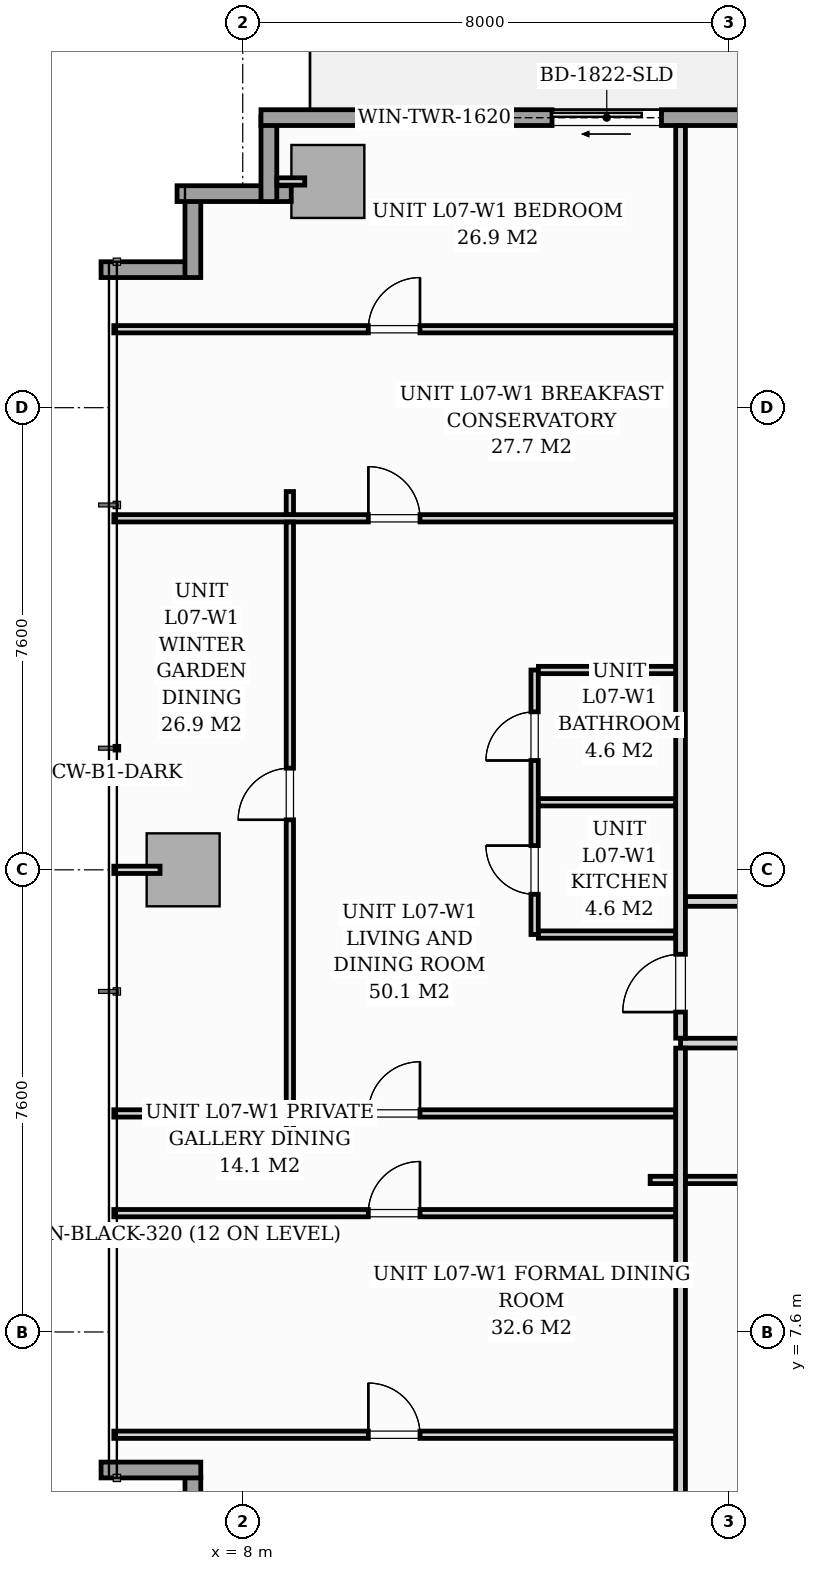
"""IFC4 building model, lengths in metres.
Left out: names, types, materials, properties, quantities, classifications, styles, units other than length and angle.
Written with IfcOpenShell. Run it as: python <this file> out.ifc"""

import sys

from ifc_helpers import new_model, si_unit, direction, frame, frame_2d, origin, origin_2d, place, context, subcontext, project, spatial, rectangle, extrude, source, transform, mapped, element, fill, save


model = new_model("IFC4")
c1 = context("Model", 3, precision=1e-05, world=origin(), true_north=direction((0.0, 1.0)))
c2 = subcontext(c1, "Body", "Model", "MODEL_VIEW")
j1 = project(units=[si_unit("LENGTHUNIT", "METRE"), si_unit("PLANEANGLEUNIT", "RADIAN")], contexts=[c1])
p1 = place(None, origin())
s1 = spatial("IfcSite", under=j1, at=p1, CompositionType="ELEMENT")
p2 = place(p1, origin())
s2 = spatial("IfcBuilding", under=s1, at=p2, CompositionType="ELEMENT")
p3 = place(p2, frame((0.0, 0.0, 29.4)))
s3 = spatial("IfcBuildingStorey", under=s2, at=p3, CompositionType="ELEMENT", Elevation=29.4)
m1 = source(origin(), c2, "Body", "SweptSolid", [
    extrude(rectangle(XDim=1.2, YDim=1.2, at=origin_2d()), origin(), (0.0, 0.0, 1.0), 3.196),
])
for number, where, z_axis, x_axis in (
    (1, (9.4, 26.52, 0.002), (0.0, 0.0, 1.0), (1.0, 0.0, 0.0)),
    (2, (7.02, 15.2, 0.002), (0.0, 0.0, 1.0), (1.0, 0.0, 0.0)),
):
    element("IfcColumn", number, at=place(p3, frame(where, z_axis=z_axis, x_axis=x_axis)), inside=s3, PredefinedType="COLUMN", context=c2, shape_type="MappedRepresentation", body=[
        mapped(m1, transform((0.0, 0.0, 0.0), scale=1.0)),
    ])
p4 = place(p3, frame((7.18, 4.065, 0.0), z_axis=(0.0, 0.0, 1.0), x_axis=(0.0, 1.0, 0.0)))
e3 = element("IfcWall", 3, at=p4, inside=s3, PredefinedType="STANDARD", context=c2, shape_type="SweptSolid", body=[
    extrude(rectangle(XDim=1.15, YDim=0.26, at=frame_2d((0.575, 0.0))), origin(), (0.0, 0.0, 1.0), 2.94),
])
p5 = place(p3, frame((7.31, 5.33, 0.0), z_axis=(0.0, 0.0, 1.0), x_axis=(-1.0, 0.0, 0.0)))
e4 = element("IfcWall", 4, at=p5, inside=s3, PredefinedType="STANDARD", context=c2, shape_type="SweptSolid", body=[
    extrude(rectangle(XDim=1.64, YDim=0.26, at=frame_2d((0.82, 0.0))), origin(), (0.0, 0.0, 1.0), 2.94),
])
for number, where, z_axis, x_axis in (
    (5, (5.67, 25.07, 0.0), (0.0, 0.0, 1.0), (1.0, 0.0, 0.0)),
    (6, (7.18, 24.94, 0.0), (0.0, 0.0, 1.0), (0.0, 1.0, 0.0)),
):
    element("IfcWall", number, at=place(p3, frame(where, z_axis=z_axis, x_axis=x_axis)), inside=s3, PredefinedType="STANDARD", context=c2, shape_type="SweptSolid", body=[
        extrude(rectangle(XDim=1.395, YDim=0.26, at=frame_2d((0.698, 0.0))), origin(), (0.0, 0.0, 1.0), 2.94),
    ])
p6 = place(p3, frame((6.92, 26.32, 0.0), z_axis=(0.0, 0.0, 1.0), x_axis=(1.0, 0.0, 0.0)))
e7 = element("IfcWall", 7, at=p6, inside=s3, PredefinedType="STANDARD", context=c2, shape_type="SweptSolid", body=[
    extrude(rectangle(XDim=1.878, YDim=0.26, at=frame_2d((0.939, 0.0))), origin(), (0.0, 0.0, 1.0), 2.94),
])
p7 = place(p3, frame((8.43, 26.19, 0.0), z_axis=(0.0, 0.0, 1.0), x_axis=(0.0, 1.0, 0.0)))
e8 = element("IfcWall", 8, at=p7, inside=s3, PredefinedType="STANDARD", context=c2, shape_type="SweptSolid", body=[
    extrude(rectangle(XDim=1.395, YDim=0.26, at=frame_2d((0.698, 0.0))), origin(), (0.0, 0.0, 1.0), 2.94),
])
p8 = place(p3, frame((8.3, 27.57, 0.0), z_axis=(0.0, 0.0, 1.0), x_axis=(1.0, 0.0, 0.0)))
e9 = element("IfcWall", 9, at=p8, inside=s3, PredefinedType="STANDARD", context=c2, shape_type="SweptSolid", body=[
    extrude(rectangle(XDim=17.15, YDim=0.26, at=frame_2d((8.575, 0.0))), origin(), (0.0, 0.0, 1.0), 2.94),
])
p9 = place(p8, frame((4.786, 0.0, 0.0)))
e10 = element("IfcOpeningElement", 10, at=p9, cuts=e9, PredefinedType="OPENING", context=c2, shape_type="SweptSolid", body=[
    extrude(rectangle(XDim=1.8, YDim=2.06, at=frame_2d((0.9, 1.03))), frame((0.0, 0.14, 0.0), z_axis=(0.0, -1.0, 0.0), x_axis=(1.0, 0.0, 0.0)), (0.0, 0.0, 1.0), 0.28),
])
p10 = place(p8, frame((2.05, 0.0, 0.65)))
e11 = element("IfcOpeningElement", 11, at=p10, cuts=e9, PredefinedType="OPENING", context=c2, shape_type="SweptSolid", body=[
    extrude(rectangle(XDim=1.6, YDim=1.5, at=frame_2d((0.8, 0.75))), frame((0.0, 0.14, 0.0), z_axis=(0.0, -1.0, 0.0), x_axis=(1.0, 0.0, 0.0)), (0.0, 0.0, 1.0), 0.28),
])
p11 = place(p3, frame((15.2, 12.35, 0.0), z_axis=(0.0, 0.0, 1.0), x_axis=(1.0, 0.0, 0.0)))
e12 = element("IfcWall", 12, at=p11, inside=s3, PredefinedType="PARTITIONING", context=c2, shape_type="SweptSolid", body=[
    extrude(rectangle(XDim=37.1, YDim=0.16, at=frame_2d((18.55, 0.0))), origin(), (0.0, 0.0, 1.0), 2.94),
])
p12 = place(p11, frame((2.964, 0.0, 0.0)))
e13 = element("IfcOpeningElement", 13, at=p12, cuts=e12, PredefinedType="OPENING", context=c2, shape_type="SweptSolid", body=[
    extrude(rectangle(XDim=0.95, YDim=2.06, at=frame_2d((0.475, 1.03))), frame((0.0, 0.09, 0.0), z_axis=(0.0, -1.0, 0.0), x_axis=(1.0, 0.0, 0.0)), (0.0, 0.0, 1.0), 0.18),
])
p13 = place(p11, frame((28.202, 0.0, 0.0)))
e14 = element("IfcOpeningElement", 14, at=p13, cuts=e12, PredefinedType="OPENING", context=c2, shape_type="SweptSolid", body=[
    extrude(rectangle(XDim=0.95, YDim=2.06, at=frame_2d((0.475, 1.03))), frame((0.0, 0.09, 0.0), z_axis=(0.0, -1.0, 0.0), x_axis=(1.0, 0.0, 0.0)), (0.0, 0.0, 1.0), 0.18),
])
p14 = place(p3, frame((15.2, 2.962, 0.0), z_axis=(0.0, 0.0, 1.0), x_axis=(0.0, 1.0, 0.0)))
e15 = element("IfcWall", 15, at=p14, inside=s3, PredefinedType="PARTITIONING", context=c2, shape_type="SweptSolid", body=[
    extrude(rectangle(XDim=9.306, YDim=0.16, at=frame_2d((4.653, 0.0))), origin(), (0.0, 0.0, 1.0), 2.94),
])
p15 = place(p3, frame((15.2, 12.432, 0.0), z_axis=(0.0, 0.0, 1.0), x_axis=(0.0, 1.0, 0.0)))
e16 = element("IfcWall", 16, at=p15, inside=s3, PredefinedType="PARTITIONING", context=c2, shape_type="SweptSolid", body=[
    extrude(rectangle(XDim=15.006, YDim=0.16, at=frame_2d((7.503, 0.0))), origin(), (0.0, 0.0, 1.0), 2.94),
])
p16 = place(p15, frame((0.429, 0.0, 0.0)))
e17 = element("IfcOpeningElement", 17, at=p16, cuts=e16, PredefinedType="OPENING", context=c2, shape_type="SweptSolid", body=[
    extrude(rectangle(XDim=0.95, YDim=2.06, at=frame_2d((0.475, 1.03))), frame((0.0, 0.09, 0.0), z_axis=(0.0, -1.0, 0.0), x_axis=(1.0, 0.0, 0.0)), (0.0, 0.0, 1.0), 0.18),
])
p17 = place(p3, frame((14.7, 10.1, 0.0), z_axis=(0.0, 0.0, 1.0), x_axis=(1.0, 0.0, 0.0)))
e18 = element("IfcWall", 18, at=p17, inside=s3, PredefinedType="PARTITIONING", context=c2, shape_type="SweptSolid", body=[
    extrude(rectangle(XDim=0.418, YDim=0.12, at=frame_2d((0.209, 0.0))), origin(), (0.0, 0.0, 1.0), 2.94),
])
p18 = place(p3, frame((15.282, 10.1, 0.0), z_axis=(0.0, 0.0, 1.0), x_axis=(1.0, 0.0, 0.0)))
e19 = element("IfcWall", 19, at=p18, inside=s3, PredefinedType="PARTITIONING", context=c2, shape_type="SweptSolid", body=[
    extrude(rectangle(XDim=2.892, YDim=0.12, at=frame_2d((1.446, 0.0))), origin(), (0.0, 0.0, 1.0), 2.94),
])
p19 = place(p3, frame((12.8, 14.136, 0.0), z_axis=(0.0, 0.0, 1.0), x_axis=(0.0, 1.0, 0.0)))
e20 = element("IfcWall", 20, at=p19, inside=s3, PredefinedType="PARTITIONING", context=c2, shape_type="SweptSolid", body=[
    extrude(rectangle(XDim=4.35, YDim=0.12, at=frame_2d((2.175, 0.0))), origin(), (0.0, 0.0, 1.0), 2.94),
])
p20 = place(p19, frame((0.662, 0.0, 0.0)))
e21 = element("IfcOpeningElement", 21, at=p20, cuts=e20, PredefinedType="OPENING", context=c2, shape_type="SweptSolid", body=[
    extrude(rectangle(XDim=0.8, YDim=2.0, at=frame_2d((0.4, 1.0))), frame((0.0, 0.07, 0.0), z_axis=(0.0, -1.0, 0.0), x_axis=(1.0, 0.0, 0.0)), (0.0, 0.0, 1.0), 0.14),
])
p21 = place(p19, frame((2.862, 0.0, 0.0)))
e22 = element("IfcOpeningElement", 22, at=p21, cuts=e20, PredefinedType="OPENING", context=c2, shape_type="SweptSolid", body=[
    extrude(rectangle(XDim=0.8, YDim=2.02, at=frame_2d((0.4, 1.01))), frame((0.0, 0.07, 0.0), z_axis=(0.0, -1.0, 0.0), x_axis=(1.0, 0.0, 0.0)), (0.0, 0.0, 1.0), 0.14),
])
p22 = place(p3, frame((12.862, 16.311, 0.0), z_axis=(0.0, 0.0, 1.0), x_axis=(1.0, 0.0, 0.0)))
e23 = element("IfcWall", 23, at=p22, inside=s3, PredefinedType="PARTITIONING", context=c2, shape_type="SweptSolid", body=[
    extrude(rectangle(XDim=2.256, YDim=0.12, at=frame_2d((1.128, 0.0))), origin(), (0.0, 0.0, 1.0), 2.045),
])
for number, where, z_axis, x_axis in (
    (24, (12.862, 14.136, 0.0), (0.0, 0.0, 1.0), (1.0, 0.0, 0.0)),
    (25, (12.862, 18.486, 0.0), (0.0, 0.0, 1.0), (1.0, 0.0, 0.0)),
):
    element("IfcWall", number, at=place(p3, frame(where, z_axis=z_axis, x_axis=x_axis)), inside=s3, PredefinedType="PARTITIONING", context=c2, shape_type="SweptSolid", body=[
        extrude(rectangle(XDim=2.256, YDim=0.12, at=frame_2d((1.128, 0.0))), origin(), (0.0, 0.0, 1.0), 2.94),
    ])
p23 = place(p3, frame((5.88, 24.09, 0.0), z_axis=(0.0, 0.0, 1.0), x_axis=(1.0, 0.0, 0.0)))
e26 = element("IfcWall", 26, at=p23, inside=s3, PredefinedType="PARTITIONING", context=c2, shape_type="SweptSolid", body=[
    extrude(rectangle(XDim=9.238, YDim=0.12, at=frame_2d((4.619, 0.0))), origin(), (0.0, 0.0, 1.0), 2.94),
])
p24 = place(p23, frame((4.185, 0.0, 0.0)))
e27 = element("IfcOpeningElement", 27, at=p24, cuts=e26, PredefinedType="OPENING", context=c2, shape_type="SweptSolid", body=[
    extrude(rectangle(XDim=0.85, YDim=2.05, at=frame_2d((0.425, 1.025))), frame((0.0, 0.07, 0.0), z_axis=(0.0, -1.0, 0.0), x_axis=(1.0, 0.0, 0.0)), (0.0, 0.0, 1.0), 0.14),
])
p25 = place(p3, frame((5.88, 5.91, 0.0), z_axis=(0.0, 0.0, 1.0), x_axis=(1.0, 0.0, 0.0)))
e28 = element("IfcWall", 28, at=p25, inside=s3, PredefinedType="PARTITIONING", context=c2, shape_type="SweptSolid", body=[
    extrude(rectangle(XDim=9.238, YDim=0.12, at=frame_2d((4.619, 0.0))), origin(), (0.0, 0.0, 1.0), 2.94),
])
p26 = place(p25, frame((4.185, 0.0, 0.0)))
e29 = element("IfcOpeningElement", 29, at=p26, cuts=e28, PredefinedType="OPENING", context=c2, shape_type="SweptSolid", body=[
    extrude(rectangle(XDim=0.85, YDim=2.05, at=frame_2d((0.425, 1.025))), frame((0.0, 0.07, 0.0), z_axis=(0.0, -1.0, 0.0), x_axis=(1.0, 0.0, 0.0)), (0.0, 0.0, 1.0), 0.14),
])
p27 = place(p3, frame((5.88, 9.554, 0.0), z_axis=(0.0, 0.0, 1.0), x_axis=(1.0, 0.0, 0.0)))
e30 = element("IfcWall", 30, at=p27, inside=s3, PredefinedType="PARTITIONING", context=c2, shape_type="SweptSolid", body=[
    extrude(rectangle(XDim=9.238, YDim=0.12, at=frame_2d((4.619, 0.0))), origin(), (0.0, 0.0, 1.0), 2.94),
])
p28 = place(p27, frame((4.185, 0.0, 0.0)))
e31 = element("IfcOpeningElement", 31, at=p28, cuts=e30, PredefinedType="OPENING", context=c2, shape_type="SweptSolid", body=[
    extrude(rectangle(XDim=0.85, YDim=2.05, at=frame_2d((0.425, 1.025))), frame((0.0, 0.07, 0.0), z_axis=(0.0, -1.0, 0.0), x_axis=(1.0, 0.0, 0.0)), (0.0, 0.0, 1.0), 0.14),
])
p29 = place(p3, frame((5.88, 20.981, 0.0), z_axis=(0.0, 0.0, 1.0), x_axis=(1.0, 0.0, 0.0)))
e32 = element("IfcWall", 32, at=p29, inside=s3, PredefinedType="PARTITIONING", context=c2, shape_type="SweptSolid", body=[
    extrude(rectangle(XDim=9.238, YDim=0.12, at=frame_2d((4.619, 0.0))), origin(), (0.0, 0.0, 1.0), 2.94),
])
p30 = place(p29, frame((4.185, 0.0, 0.0)))
e33 = element("IfcOpeningElement", 33, at=p30, cuts=e32, PredefinedType="OPENING", context=c2, shape_type="SweptSolid", body=[
    extrude(rectangle(XDim=0.85, YDim=2.05, at=frame_2d((0.425, 1.025))), frame((0.0, 0.07, 0.0), z_axis=(0.0, -1.0, 0.0), x_axis=(1.0, 0.0, 0.0)), (0.0, 0.0, 1.0), 0.14),
])
p31 = place(p3, frame((5.88, 11.194, 0.0), z_axis=(0.0, 0.0, 1.0), x_axis=(1.0, 0.0, 0.0)))
e34 = element("IfcWall", 34, at=p31, inside=s3, PredefinedType="PARTITIONING", context=c2, shape_type="SweptSolid", body=[
    extrude(rectangle(XDim=9.238, YDim=0.12, at=frame_2d((4.619, 0.0))), origin(), (0.0, 0.0, 1.0), 2.94),
])
p32 = place(p31, frame((4.185, 0.0, 0.0)))
e35 = element("IfcOpeningElement", 35, at=p32, cuts=e34, PredefinedType="OPENING", context=c2, shape_type="SweptSolid", body=[
    extrude(rectangle(XDim=0.85, YDim=2.05, at=frame_2d((0.425, 1.025))), frame((0.0, 0.07, 0.0), z_axis=(0.0, -1.0, 0.0), x_axis=(1.0, 0.0, 0.0)), (0.0, 0.0, 1.0), 0.14),
])
p33 = place(p3, frame((8.775, 10.754, 0.0), z_axis=(0.0, 0.0, 1.0), x_axis=(0.0, 1.0, 0.0)))
e36 = element("IfcWall", 36, at=p33, inside=s3, PredefinedType="PARTITIONING", context=c2, shape_type="SweptSolid", body=[
    extrude(rectangle(XDim=0.378, YDim=0.12, at=frame_2d((0.189, 0.0))), origin(), (0.0, 0.0, 1.0), 2.94),
])
p34 = place(p3, frame((8.775, 11.256, 0.0), z_axis=(0.0, 0.0, 1.0), x_axis=(0.0, 1.0, 0.0)))
e37 = element("IfcWall", 37, at=p34, inside=s3, PredefinedType="PARTITIONING", context=c2, shape_type="SweptSolid", body=[
    extrude(rectangle(XDim=9.663, YDim=0.12, at=frame_2d((4.832, 0.0))), origin(), (0.0, 0.0, 1.0), 2.94),
])
p35 = place(p34, frame((4.766, 0.0, 0.0)))
e38 = element("IfcOpeningElement", 38, at=p35, cuts=e37, PredefinedType="OPENING", context=c2, shape_type="SweptSolid", body=[
    extrude(rectangle(XDim=0.85, YDim=2.05, at=frame_2d((0.425, 1.025))), frame((0.0, 0.07, 0.0), z_axis=(0.0, -1.0, 0.0), x_axis=(1.0, 0.0, 0.0)), (0.0, 0.0, 1.0), 0.14),
])
p36 = place(p3, frame((8.775, 21.043, 0.0), z_axis=(0.0, 0.0, 1.0), x_axis=(0.0, 1.0, 0.0)))
e39 = element("IfcWall", 39, at=p36, inside=s3, PredefinedType="PARTITIONING", context=c2, shape_type="SweptSolid", body=[
    extrude(rectangle(XDim=0.378, YDim=0.12, at=frame_2d((0.189, 0.0))), origin(), (0.0, 0.0, 1.0), 2.94),
])
p37 = place(p3, frame((15.282, 14.68, 0.0), z_axis=(0.0, 0.0, 1.0), x_axis=(1.0, 0.0, 0.0)))
e40 = element("IfcWall", 40, at=p37, inside=s3, PredefinedType="PARTITIONING", context=c2, shape_type="SweptSolid", body=[
    extrude(rectangle(XDim=10.878, YDim=0.16, at=frame_2d((5.439, 0.0))), origin(), (0.0, 0.0, 1.0), 2.94),
])
p38 = place(p37, frame((4.863, 0.0, 0.0)))
e41 = element("IfcOpeningElement", 41, at=p38, cuts=e40, PredefinedType="OPENING", context=c2, shape_type="SweptSolid", body=[
    extrude(rectangle(XDim=0.95, YDim=2.06, at=frame_2d((0.475, 1.03))), frame((0.0, 0.09, 0.0), z_axis=(0.0, -1.0, 0.0), x_axis=(1.0, 0.0, 0.0)), (0.0, 0.0, 1.0), 0.18),
])
p39 = place(p3, frame((9.02, 26.52, 0.0), z_axis=(0.0, 0.0, 1.0), x_axis=(-1.0, 0.0, 0.0)))
e42 = element("IfcWall", 42, at=p39, inside=s3, PredefinedType="PARTITIONING", context=c2, shape_type="SweptSolid", body=[
    extrude(rectangle(XDim=0.458, YDim=0.12, at=frame_2d((0.229, 0.0))), origin(), (0.0, 0.0, 1.0), 2.94),
])
p40 = place(p3, frame((6.64, 15.2, 0.0), z_axis=(0.0, 0.0, 1.0), x_axis=(-1.0, 0.0, 0.0)))
e43 = element("IfcWall", 43, at=p40, inside=s3, PredefinedType="PARTITIONING", context=c2, shape_type="SweptSolid", body=[
    extrude(rectangle(XDim=0.76, YDim=0.12, at=frame_2d((0.38, 0.0))), origin(), (0.0, 0.0, 1.0), 2.94),
])
m2 = source(origin(), c2, "Body", "SweptSolid", [
    extrude(rectangle(XDim=1.8, YDim=2.06, at=frame_2d((0.9, 1.03))), frame((0.0, 0.025, 0.0), z_axis=(0.0, -1.0, 0.0), x_axis=(1.0, 0.0, 0.0)), (0.0, 0.0, 1.0), 0.05),
])
p41 = place(p9, origin())
e44 = element("IfcDoor", 44, at=p41, inside=s3, OperationType="SLIDING_TO_LEFT", PredefinedType="DOOR", context=c2, shape_type="MappedRepresentation", body=[
    mapped(m2, transform((0.0, 0.0, 0.0), scale=1.0)),
])
fill(e10, e44)
m3 = source(origin(), c2, "Body", "SweptSolid", [
    extrude(rectangle(XDim=1.6, YDim=1.5, at=frame_2d((0.8, 0.75))), frame((0.0, 0.03, 0.0), z_axis=(0.0, -1.0, 0.0), x_axis=(1.0, 0.0, 0.0)), (0.0, 0.0, 1.0), 0.06),
])
p42 = place(p10, origin())
e45 = element("IfcWindow", 45, at=p42, inside=s3, PartitioningType="SINGLE_PANEL", PredefinedType="WINDOW", context=c2, shape_type="MappedRepresentation", body=[
    mapped(m3, transform((0.0, 0.0, 0.0), scale=1.0)),
])
fill(e11, e45)
m4 = source(origin(), c2, "Body", "SweptSolid", [
    extrude(rectangle(XDim=0.95, YDim=2.06, at=frame_2d((0.475, 1.03))), frame((0.0, 0.025, 0.0), z_axis=(0.0, -1.0, 0.0), x_axis=(1.0, 0.0, 0.0)), (0.0, 0.0, 1.0), 0.05),
])
p43 = place(p16, origin())
e46 = element("IfcDoor", 46, at=p43, inside=s3, OperationType="SINGLE_SWING_LEFT", PredefinedType="DOOR", context=c2, shape_type="MappedRepresentation", body=[
    mapped(m4, transform((0.0, 0.0, 0.0), scale=1.0)),
])
fill(e17, e46)
m5 = source(origin(), c2, "Body", "SweptSolid", [
    extrude(rectangle(XDim=0.8, YDim=2.0, at=frame_2d((0.4, 1.0))), frame((0.0, 0.025, 0.0), z_axis=(0.0, -1.0, 0.0), x_axis=(1.0, 0.0, 0.0)), (0.0, 0.0, 1.0), 0.05),
])
p44 = place(p20, origin())
e47 = element("IfcDoor", 47, at=p44, inside=s3, OperationType="SINGLE_SWING_RIGHT", PredefinedType="DOOR", context=c2, shape_type="MappedRepresentation", body=[
    mapped(m5, transform((0.0, 0.0, 0.0), scale=1.0)),
])
fill(e21, e47)
m6 = source(origin(), c2, "Body", "SweptSolid", [
    extrude(rectangle(XDim=0.8, YDim=2.02, at=frame_2d((0.4, 1.01))), frame((0.0, 0.025, 0.0), z_axis=(0.0, -1.0, 0.0), x_axis=(1.0, 0.0, 0.0)), (0.0, 0.0, 1.0), 0.05),
])
p45 = place(p21, origin())
e48 = element("IfcDoor", 48, at=p45, inside=s3, OperationType="SINGLE_SWING_LEFT", PredefinedType="DOOR", context=c2, shape_type="MappedRepresentation", body=[
    mapped(m6, transform((0.0, 0.0, 0.0), scale=1.0)),
])
fill(e22, e48)
m7 = source(origin(), c2, "Body", "SweptSolid", [
    extrude(rectangle(XDim=0.85, YDim=2.05, at=frame_2d((0.425, 1.025))), frame((0.0, 0.025, 0.0), z_axis=(0.0, -1.0, 0.0), x_axis=(1.0, 0.0, 0.0)), (0.0, 0.0, 1.0), 0.05),
])
p46 = place(p24, origin())
e49 = element("IfcDoor", 49, at=p46, inside=s3, OperationType="SINGLE_SWING_RIGHT", PredefinedType="DOOR", context=c2, shape_type="MappedRepresentation", body=[
    mapped(m7, transform((0.0, 0.0, 0.0), scale=1.0)),
])
fill(e27, e49)
p47 = place(p26, origin())
e50 = element("IfcDoor", 50, at=p47, inside=s3, OperationType="SINGLE_SWING_LEFT", PredefinedType="DOOR", context=c2, shape_type="MappedRepresentation", body=[
    mapped(m7, transform((0.0, 0.0, 0.0), scale=1.0)),
])
fill(e29, e50)
p48 = place(p28, origin())
e51 = element("IfcDoor", 51, at=p48, inside=s3, OperationType="SINGLE_SWING_RIGHT", PredefinedType="DOOR", context=c2, shape_type="MappedRepresentation", body=[
    mapped(m7, transform((0.0, 0.0, 0.0), scale=1.0)),
])
fill(e31, e51)
p49 = place(p30, origin())
e52 = element("IfcDoor", 52, at=p49, inside=s3, OperationType="SINGLE_SWING_LEFT", PredefinedType="DOOR", context=c2, shape_type="MappedRepresentation", body=[
    mapped(m7, transform((0.0, 0.0, 0.0), scale=1.0)),
])
fill(e33, e52)
p50 = place(p32, origin())
e53 = element("IfcDoor", 53, at=p50, inside=s3, OperationType="SINGLE_SWING_RIGHT", PredefinedType="DOOR", context=c2, shape_type="MappedRepresentation", body=[
    mapped(m7, transform((0.0, 0.0, 0.0), scale=1.0)),
])
fill(e35, e53)
p51 = place(p35, origin())
e54 = element("IfcDoor", 54, at=p51, inside=s3, OperationType="SINGLE_SWING_LEFT", PredefinedType="DOOR", context=c2, shape_type="MappedRepresentation", body=[
    mapped(m7, transform((0.0, 0.0, 0.0), scale=1.0)),
])
fill(e38, e54)
save(model, sys.argv[1])
